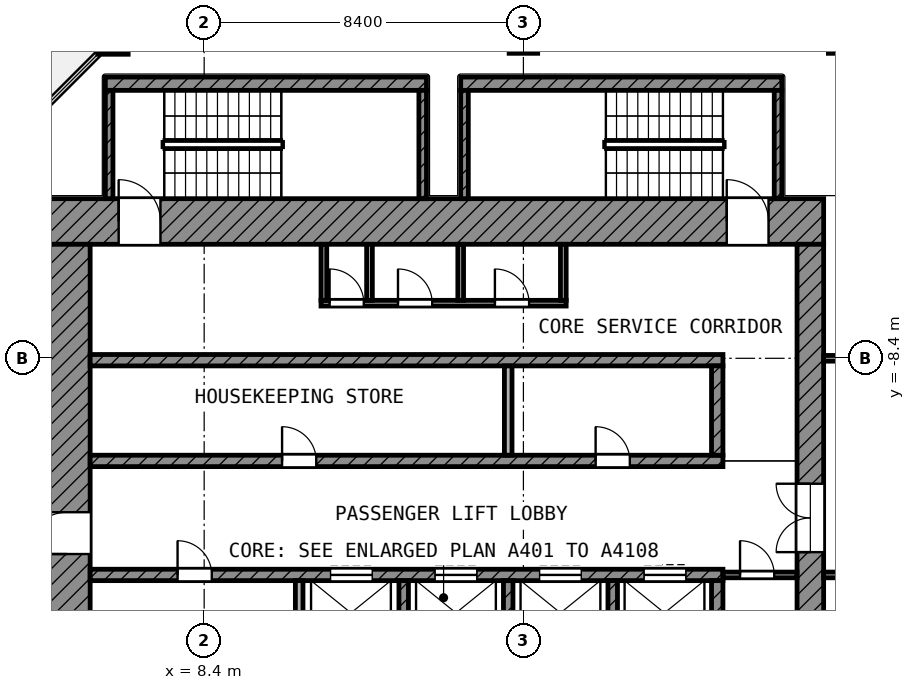
"""IFC4 building model, lengths in metres.
Left out: names, types, materials, properties, quantities, classifications, styles, units other than length and angle.
Written with IfcOpenShell. Run it as: python <this file> out.ifc"""

import sys

from ifc_helpers import new_model, si_unit, direction, frame, frame_2d, origin, origin_2d, place, context, subcontext, project, spatial, rectangle, extrude, element, fill, save


model = new_model("IFC4")
c1 = context("Model", 3, precision=1e-05, world=origin(), true_north=direction((0.0, 1.0)))
c2 = subcontext(c1, "Body", "Model", "MODEL_VIEW")
j1 = project(units=[si_unit("LENGTHUNIT", "METRE"), si_unit("PLANEANGLEUNIT", "RADIAN")], contexts=[c1])
p1 = place(None, origin())
s1 = spatial("IfcSite", under=j1, at=p1, CompositionType="ELEMENT")
p2 = place(p1, origin())
s2 = spatial("IfcBuilding", under=s1, at=p2, CompositionType="ELEMENT")
p3 = place(p2, frame((0.0, 0.0, 307.0)))
s3 = spatial("IfcBuildingStorey", under=s2, at=p3, CompositionType="ELEMENT", Elevation=307.0)
p4 = place(p3, frame((6.0, 0.0, 0.0), z_axis=(0.0, 0.0, 1.0), x_axis=(1.0, 0.0, 0.0)))
e1 = element("IfcColumn", 1, at=p4, inside=s3, PredefinedType="COLUMN", context=c2, shape_type="SweptSolid", body=[
    extrude(rectangle(XDim=0.8, YDim=0.8, at=origin_2d()), origin(), (0.0, 0.0, 1.0), 4.2),
])
for number, where, z_axis, x_axis in (
    (2, (16.8, 0.0, 0.0), (0.0, 0.0, 1.0), (1.0, 0.0, 0.0)),
    (3, (25.2, 0.0, 0.0), (0.0, 0.0, 1.0), (1.0, 0.0, 0.0)),
):
    element("IfcColumn", number, at=place(p3, frame(where, z_axis=z_axis, x_axis=x_axis)), inside=s3, PredefinedType="COLUMN", context=c2, shape_type="SweptSolid", body=[
        extrude(rectangle(XDim=0.75, YDim=0.75, at=origin_2d()), origin(), (0.0, 0.0, 1.0), 4.2),
    ])
p5 = place(p3, frame((4.2, -4.8, 0.0), z_axis=(0.0, 0.0, 1.0), x_axis=(1.0, 0.0, 0.0)))
e4 = element("IfcWall", 4, at=p5, inside=s3, PredefinedType="SHEAR", context=c2, shape_type="SweptSolid", body=[
    extrude(rectangle(XDim=20.5, YDim=1.2, at=frame_2d((10.25, 0.0))), origin(), (0.0, 0.0, 1.0), 3.6),
])
p6 = place(p5, frame((1.95, 0.0, 0.0)))
e5 = element("IfcOpeningElement", 5, at=p6, cuts=e4, PredefinedType="OPENING", context=c2, shape_type="SweptSolid", body=[
    extrude(rectangle(XDim=1.1, YDim=2.1, at=frame_2d((0.55, 1.05))), frame((0.0, 0.61, 0.0), z_axis=(0.0, -1.0, 0.0), x_axis=(1.0, 0.0, 0.0)), (0.0, 0.0, 1.0), 1.22),
])
p7 = place(p5, frame((17.95, 0.0, 0.0)))
e6 = element("IfcOpeningElement", 6, at=p7, cuts=e4, PredefinedType="OPENING", context=c2, shape_type="SweptSolid", body=[
    extrude(rectangle(XDim=1.1, YDim=2.1, at=frame_2d((0.55, 1.05))), frame((0.0, 0.61, 0.0), z_axis=(0.0, -1.0, 0.0), x_axis=(1.0, 0.0, 0.0)), (0.0, 0.0, 1.0), 1.22),
])
p8 = place(p3, frame((4.8, -24.7, 0.0), z_axis=(0.0, 0.0, 1.0), x_axis=(0.0, 1.0, 0.0)))
e7 = element("IfcWall", 7, at=p8, inside=s3, PredefinedType="SHEAR", context=c2, shape_type="SweptSolid", body=[
    extrude(rectangle(XDim=19.3, YDim=1.2, at=frame_2d((9.65, 0.0))), origin(), (0.0, 0.0, 1.0), 3.6),
])
p9 = place(p8, frame((11.15, 0.0, 0.0)))
e8 = element("IfcOpeningElement", 8, at=p9, cuts=e7, PredefinedType="OPENING", context=c2, shape_type="SweptSolid", body=[
    extrude(rectangle(XDim=1.1, YDim=2.1, at=frame_2d((0.55, 1.05))), frame((0.0, 0.61, 0.0), z_axis=(0.0, -1.0, 0.0), x_axis=(1.0, 0.0, 0.0)), (0.0, 0.0, 1.0), 1.22),
])
p10 = place(p8, frame((1.85, 0.0, 0.0)))
e9 = element("IfcOpeningElement", 9, at=p10, cuts=e7, PredefinedType="OPENING", context=c2, shape_type="SweptSolid", body=[
    extrude(rectangle(XDim=1.1, YDim=2.1, at=frame_2d((0.55, 1.05))), frame((0.0, 0.61, 0.0), z_axis=(0.0, -1.0, 0.0), x_axis=(1.0, 0.0, 0.0)), (0.0, 0.0, 1.0), 1.22),
])
p11 = place(p3, frame((24.35, -24.0, 0.0), z_axis=(0.0, 0.0, 1.0), x_axis=(0.0, 1.0, 0.0)))
e10 = element("IfcWall", 10, at=p11, inside=s3, PredefinedType="SHEAR", context=c2, shape_type="SweptSolid", body=[
    extrude(rectangle(XDim=18.6, YDim=0.7, at=frame_2d((9.3, 0.0))), origin(), (0.0, 0.0, 1.0), 3.6),
])
p12 = place(p11, frame((10.5, 0.0, 0.0)))
e11 = element("IfcOpeningElement", 11, at=p12, cuts=e10, PredefinedType="OPENING", context=c2, shape_type="SweptSolid", body=[
    extrude(rectangle(XDim=1.8, YDim=2.1, at=frame_2d((0.9, 1.05))), frame((0.0, 0.36, 0.0), z_axis=(0.0, -1.0, 0.0), x_axis=(1.0, 0.0, 0.0)), (0.0, 0.0, 1.0), 0.72),
])
p13 = place(p3, frame((5.4, -8.45, 0.0), z_axis=(0.0, 0.0, 1.0), x_axis=(1.0, 0.0, 0.0)))
e12 = element("IfcWall", 12, at=p13, inside=s3, PredefinedType="SHEAR", context=c2, shape_type="SweptSolid", body=[
    extrude(rectangle(XDim=16.65, YDim=0.3, at=frame_2d((8.325, 0.0))), origin(), (0.0, 0.0, 1.0), 3.6),
])
p14 = place(p3, frame((5.4, -11.1, 0.0), z_axis=(0.0, 0.0, 1.0), x_axis=(1.0, 0.0, 0.0)))
e13 = element("IfcWall", 13, at=p14, inside=s3, PredefinedType="SHEAR", context=c2, shape_type="SweptSolid", body=[
    extrude(rectangle(XDim=16.65, YDim=0.3, at=frame_2d((8.325, 0.0))), origin(), (0.0, 0.0, 1.0), 3.6),
])
p15 = place(p14, frame((5.05, 0.0, 0.0)))
e14 = element("IfcOpeningElement", 14, at=p15, cuts=e13, PredefinedType="OPENING", context=c2, shape_type="SweptSolid", body=[
    extrude(rectangle(XDim=0.9, YDim=2.1, at=frame_2d((0.45, 1.05))), frame((0.0, 0.16, 0.0), z_axis=(0.0, -1.0, 0.0), x_axis=(1.0, 0.0, 0.0)), (0.0, 0.0, 1.0), 0.32),
])
p16 = place(p14, frame((13.3, 0.0, 0.0)))
e15 = element("IfcOpeningElement", 15, at=p16, cuts=e13, PredefinedType="OPENING", context=c2, shape_type="SweptSolid", body=[
    extrude(rectangle(XDim=0.9, YDim=2.1, at=frame_2d((0.45, 1.05))), frame((0.0, 0.16, 0.0), z_axis=(0.0, -1.0, 0.0), x_axis=(1.0, 0.0, 0.0)), (0.0, 0.0, 1.0), 0.32),
])
p17 = place(p3, frame((5.4, -14.1, 0.0), z_axis=(0.0, 0.0, 1.0), x_axis=(1.0, 0.0, 0.0)))
e16 = element("IfcWall", 16, at=p17, inside=s3, PredefinedType="SHEAR", context=c2, shape_type="SweptSolid", body=[
    extrude(rectangle(XDim=16.65, YDim=0.3, at=frame_2d((8.325, 0.0))), origin(), (0.0, 0.0, 1.0), 3.6),
])
p18 = place(p17, frame((6.325, 0.0, 0.0)))
e17 = element("IfcOpeningElement", 17, at=p18, cuts=e16, PredefinedType="OPENING", context=c2, shape_type="SweptSolid", body=[
    extrude(rectangle(XDim=1.1, YDim=2.1, at=frame_2d((0.55, 1.05))), frame((0.0, 0.16, 0.0), z_axis=(0.0, -1.0, 0.0), x_axis=(1.0, 0.0, 0.0)), (0.0, 0.0, 1.0), 0.32),
])
p19 = place(p17, frame((9.075, 0.0, 0.0)))
e18 = element("IfcOpeningElement", 18, at=p19, cuts=e16, PredefinedType="OPENING", context=c2, shape_type="SweptSolid", body=[
    extrude(rectangle(XDim=1.1, YDim=2.1, at=frame_2d((0.55, 1.05))), frame((0.0, 0.16, 0.0), z_axis=(0.0, -1.0, 0.0), x_axis=(1.0, 0.0, 0.0)), (0.0, 0.0, 1.0), 0.32),
])
p20 = place(p17, frame((11.825, 0.0, 0.0)))
e19 = element("IfcOpeningElement", 19, at=p20, cuts=e16, PredefinedType="OPENING", context=c2, shape_type="SweptSolid", body=[
    extrude(rectangle(XDim=1.1, YDim=2.1, at=frame_2d((0.55, 1.05))), frame((0.0, 0.16, 0.0), z_axis=(0.0, -1.0, 0.0), x_axis=(1.0, 0.0, 0.0)), (0.0, 0.0, 1.0), 0.32),
])
p21 = place(p17, frame((14.575, 0.0, 0.0)))
e20 = element("IfcOpeningElement", 20, at=p21, cuts=e16, PredefinedType="OPENING", context=c2, shape_type="SweptSolid", body=[
    extrude(rectangle(XDim=1.1, YDim=2.1, at=frame_2d((0.55, 1.05))), frame((0.0, 0.16, 0.0), z_axis=(0.0, -1.0, 0.0), x_axis=(1.0, 0.0, 0.0)), (0.0, 0.0, 1.0), 0.32),
])
p22 = place(p17, frame((2.3, 0.0, 0.0)))
e21 = element("IfcOpeningElement", 21, at=p22, cuts=e16, PredefinedType="OPENING", context=c2, shape_type="SweptSolid", body=[
    extrude(rectangle(XDim=0.9, YDim=2.1, at=frame_2d((0.45, 1.05))), frame((0.0, 0.16, 0.0), z_axis=(0.0, -1.0, 0.0), x_axis=(1.0, 0.0, 0.0)), (0.0, 0.0, 1.0), 0.32),
])
p23 = place(p3, frame((21.9, -10.95, 0.0), z_axis=(0.0, 0.0, 1.0), x_axis=(0.0, 1.0, 0.0)))
e22 = element("IfcWall", 22, at=p23, inside=s3, PredefinedType="SHEAR", context=c2, shape_type="SweptSolid", body=[
    extrude(rectangle(XDim=2.35, YDim=0.3, at=frame_2d((1.175, 0.0))), origin(), (0.0, 0.0, 1.0), 3.6),
])
p24 = place(p3, frame((21.9, -16.6, 0.0), z_axis=(0.0, 0.0, 1.0), x_axis=(0.0, 1.0, 0.0)))
e23 = element("IfcWall", 23, at=p24, inside=s3, PredefinedType="SHEAR", context=c2, shape_type="SweptSolid", body=[
    extrude(rectangle(XDim=2.35, YDim=0.3, at=frame_2d((1.175, 0.0))), origin(), (0.0, 0.0, 1.0), 3.6),
])
p25 = place(p3, frame((16.4, -10.95, 0.0), z_axis=(0.0, 0.0, 1.0), x_axis=(0.0, 1.0, 0.0)))
e24 = element("IfcWall", 24, at=p25, inside=s3, PredefinedType="PARTITIONING", context=c2, shape_type="SweptSolid", body=[
    extrude(rectangle(XDim=2.35, YDim=0.2, at=frame_2d((1.175, 0.0))), origin(), (0.0, 0.0, 1.0), 3.6),
])
p26 = place(p3, frame((10.9, -16.6, 0.0), z_axis=(0.0, 0.0, 1.0), x_axis=(0.0, 1.0, 0.0)))
e25 = element("IfcWall", 25, at=p26, inside=s3, PredefinedType="PARTITIONING", context=c2, shape_type="SweptSolid", body=[
    extrude(rectangle(XDim=2.35, YDim=0.2, at=frame_2d((1.175, 0.0))), origin(), (0.0, 0.0, 1.0), 3.6),
])
for number, where, z_axis, x_axis in (
    (26, (13.65, -16.6, 0.0), (0.0, 0.0, 1.0), (0.0, 1.0, 0.0)),
    (27, (16.4, -16.6, 0.0), (0.0, 0.0, 1.0), (0.0, 1.0, 0.0)),
    (28, (19.15, -16.6, 0.0), (0.0, 0.0, 1.0), (0.0, 1.0, 0.0)),
):
    element("IfcWall", number, at=place(p3, frame(where, z_axis=z_axis, x_axis=x_axis)), inside=s3, PredefinedType="SHEAR", context=c2, shape_type="SweptSolid", body=[
        extrude(rectangle(XDim=2.35, YDim=0.25, at=frame_2d((1.175, 0.0))), origin(), (0.0, 0.0, 1.0), 3.6),
    ])
p27 = place(p3, frame((22.05, -14.1, 0.0), z_axis=(0.0, 0.0, 1.0), x_axis=(1.0, 0.0, 0.0)))
e29 = element("IfcWall", 29, at=p27, inside=s3, PredefinedType="PARTITIONING", context=c2, shape_type="SweptSolid", body=[
    extrude(rectangle(XDim=1.95, YDim=0.15, at=frame_2d((0.975, 0.0))), origin(), (0.0, 0.0, 1.0), 3.6),
])
p28 = place(p27, frame((0.45, 0.0, 0.0)))
e30 = element("IfcOpeningElement", 30, at=p28, cuts=e29, PredefinedType="OPENING", context=c2, shape_type="SweptSolid", body=[
    extrude(rectangle(XDim=0.9, YDim=2.1, at=frame_2d((0.45, 1.05))), frame((0.0, 0.085, 0.0), z_axis=(0.0, -1.0, 0.0), x_axis=(1.0, 0.0, 0.0)), (0.0, 0.0, 1.0), 0.17),
])
p29 = place(p3, frame((11.475, -6.95, 0.0), z_axis=(0.0, 0.0, 1.0), x_axis=(1.0, 0.0, 0.0)))
e31 = element("IfcWall", 31, at=p29, inside=s3, PredefinedType="PARTITIONING", context=c2, shape_type="SweptSolid", body=[
    extrude(rectangle(XDim=6.45, YDim=0.15, at=frame_2d((3.225, 0.0))), origin(), (0.0, 0.0, 1.0), 3.6),
])
p30 = place(p29, frame((0.225, 0.0, 0.0)))
e32 = element("IfcOpeningElement", 32, at=p30, cuts=e31, PredefinedType="OPENING", context=c2, shape_type="SweptSolid", body=[
    extrude(rectangle(XDim=0.9, YDim=2.1, at=frame_2d((0.45, 1.05))), frame((0.0, 0.085, 0.0), z_axis=(0.0, -1.0, 0.0), x_axis=(1.0, 0.0, 0.0)), (0.0, 0.0, 1.0), 0.17),
])
p31 = place(p29, frame((2.025, 0.0, 0.0)))
e33 = element("IfcOpeningElement", 33, at=p31, cuts=e31, PredefinedType="OPENING", context=c2, shape_type="SweptSolid", body=[
    extrude(rectangle(XDim=0.9, YDim=2.1, at=frame_2d((0.45, 1.05))), frame((0.0, 0.085, 0.0), z_axis=(0.0, -1.0, 0.0), x_axis=(1.0, 0.0, 0.0)), (0.0, 0.0, 1.0), 0.17),
])
p32 = place(p29, frame((4.575, 0.0, 0.0)))
e34 = element("IfcOpeningElement", 34, at=p32, cuts=e31, PredefinedType="OPENING", context=c2, shape_type="SweptSolid", body=[
    extrude(rectangle(XDim=0.9, YDim=2.1, at=frame_2d((0.45, 1.05))), frame((0.0, 0.085, 0.0), z_axis=(0.0, -1.0, 0.0), x_axis=(1.0, 0.0, 0.0)), (0.0, 0.0, 1.0), 0.17),
])
for number, where, z_axis, x_axis in (
    (35, (11.55, -6.875, 0.0), (0.0, 0.0, 1.0), (0.0, 1.0, 0.0)),
    (36, (12.75, -6.875, 0.0), (0.0, 0.0, 1.0), (0.0, 1.0, 0.0)),
    (37, (15.15, -6.875, 0.0), (0.0, 0.0, 1.0), (0.0, 1.0, 0.0)),
    (38, (17.85, -6.875, 0.0), (0.0, 0.0, 1.0), (0.0, 1.0, 0.0)),
):
    element("IfcWall", number, at=place(p3, frame(where, z_axis=z_axis, x_axis=x_axis)), inside=s3, PredefinedType="PARTITIONING", context=c2, shape_type="SweptSolid", body=[
        extrude(rectangle(XDim=1.475, YDim=0.15, at=frame_2d((0.738, 0.0))), origin(), (0.0, 0.0, 1.0), 3.6),
    ])
p33 = place(p3, frame((5.8, -1.175, 0.0), z_axis=(0.0, 0.0, 1.0), x_axis=(1.0, 0.0, 0.0)))
e39 = element("IfcWall", 39, at=p33, inside=s3, PredefinedType="SHEAR", context=c2, shape_type="SweptSolid", body=[
    extrude(rectangle(XDim=8.45, YDim=0.35, at=frame_2d((4.225, 0.0))), origin(), (0.0, 0.0, 1.0), 3.6),
])
for number, where, z_axis, x_axis in (
    (40, (5.9, -4.2, 0.0), (0.0, 0.0, 1.0), (0.0, 1.0, 0.0)),
    (41, (14.15, -4.2, 0.0), (0.0, 0.0, 1.0), (0.0, 1.0, 0.0)),
):
    element("IfcWall", number, at=place(p3, frame(where, z_axis=z_axis, x_axis=x_axis)), inside=s3, PredefinedType="SHEAR", context=c2, shape_type="SweptSolid", body=[
        extrude(rectangle(XDim=2.85, YDim=0.2, at=frame_2d((1.425, 0.0))), origin(), (0.0, 0.0, 1.0), 3.6),
    ])
p34 = place(p3, frame((15.15, -1.175, 0.0), z_axis=(0.0, 0.0, 1.0), x_axis=(1.0, 0.0, 0.0)))
e42 = element("IfcWall", 42, at=p34, inside=s3, PredefinedType="SHEAR", context=c2, shape_type="SweptSolid", body=[
    extrude(rectangle(XDim=8.45, YDim=0.35, at=frame_2d((4.225, 0.0))), origin(), (0.0, 0.0, 1.0), 3.6),
])
for number, where, z_axis, x_axis in (
    (43, (15.25, -4.2, 0.0), (0.0, 0.0, 1.0), (0.0, 1.0, 0.0)),
    (44, (23.5, -4.2, 0.0), (0.0, 0.0, 1.0), (0.0, 1.0, 0.0)),
):
    element("IfcWall", number, at=place(p3, frame(where, z_axis=z_axis, x_axis=x_axis)), inside=s3, PredefinedType="SHEAR", context=c2, shape_type="SweptSolid", body=[
        extrude(rectangle(XDim=2.85, YDim=0.2, at=frame_2d((1.425, 0.0))), origin(), (0.0, 0.0, 1.0), 3.6),
    ])
p35 = place(p3, frame((24.7, -14.1, 0.0), z_axis=(0.0, 0.0, 1.0), x_axis=(1.0, 0.0, 0.0)))
e45 = element("IfcWall", 45, at=p35, inside=s3, PredefinedType="PARTITIONING", context=c2, shape_type="SweptSolid", body=[
    extrude(rectangle(XDim=4.625, YDim=0.15, at=frame_2d((2.312, 0.0))), origin(), (0.0, 0.0, 1.0), 3.6),
])
p36 = place(p35, frame((1.85, 0.0, 0.0)))
e46 = element("IfcOpeningElement", 46, at=p36, cuts=e45, PredefinedType="OPENING", context=c2, shape_type="SweptSolid", body=[
    extrude(rectangle(XDim=1.5, YDim=2.1, at=frame_2d((0.75, 1.05))), frame((0.0, 0.085, 0.0), z_axis=(0.0, -1.0, 0.0), x_axis=(1.0, 0.0, 0.0)), (0.0, 0.0, 1.0), 0.17),
])
p37 = place(p3, frame((24.7, -8.4, 0.0), z_axis=(0.0, 0.0, 1.0), x_axis=(1.0, 0.0, 0.0)))
e47 = element("IfcWall", 47, at=p37, inside=s3, PredefinedType="PARTITIONING", context=c2, shape_type="SweptSolid", body=[
    extrude(rectangle(XDim=15.582, YDim=0.15, at=frame_2d((7.791, 0.0))), origin(), (0.0, 0.0, 1.0), 3.6),
])
p38 = place(p37, frame((1.85, 0.0, 0.0)))
e48 = element("IfcOpeningElement", 48, at=p38, cuts=e47, PredefinedType="OPENING", context=c2, shape_type="SweptSolid", body=[
    extrude(rectangle(XDim=1.2, YDim=2.1, at=frame_2d((0.6, 1.05))), frame((0.0, 0.085, 0.0), z_axis=(0.0, -1.0, 0.0), x_axis=(1.0, 0.0, 0.0)), (0.0, 0.0, 1.0), 0.17),
])
p39 = place(p37, frame((6.7, 0.0, 0.0)))
e49 = element("IfcOpeningElement", 49, at=p39, cuts=e47, PredefinedType="OPENING", context=c2, shape_type="SweptSolid", body=[
    extrude(rectangle(XDim=1.2, YDim=2.1, at=frame_2d((0.6, 1.05))), frame((0.0, 0.085, 0.0), z_axis=(0.0, -1.0, 0.0), x_axis=(1.0, 0.0, 0.0)), (0.0, 0.0, 1.0), 0.17),
])
p40 = place(p37, frame((9.4, 0.0, 0.0)))
e50 = element("IfcOpeningElement", 50, at=p40, cuts=e47, PredefinedType="OPENING", context=c2, shape_type="SweptSolid", body=[
    extrude(rectangle(XDim=1.2, YDim=2.1, at=frame_2d((0.6, 1.05))), frame((0.0, 0.085, 0.0), z_axis=(0.0, -1.0, 0.0), x_axis=(1.0, 0.0, 0.0)), (0.0, 0.0, 1.0), 0.17),
])
p41 = place(p18, origin())
e51 = element("IfcDoor", 51, at=p41, inside=s3, OperationType="DOUBLE_DOOR_SLIDING", PredefinedType="DOOR", context=c2, shape_type="SweptSolid", body=[
    extrude(rectangle(XDim=1.1, YDim=2.1, at=frame_2d((0.55, 1.05))), frame((0.0, 0.025, 0.0), z_axis=(0.0, -1.0, 0.0), x_axis=(1.0, 0.0, 0.0)), (0.0, 0.0, 1.0), 0.05),
])
fill(e17, e51)
p42 = place(p19, origin())
e52 = element("IfcDoor", 52, at=p42, inside=s3, OperationType="DOUBLE_DOOR_SLIDING", PredefinedType="DOOR", context=c2, shape_type="SweptSolid", body=[
    extrude(rectangle(XDim=1.1, YDim=2.1, at=frame_2d((0.55, 1.05))), frame((0.0, 0.025, 0.0), z_axis=(0.0, -1.0, 0.0), x_axis=(1.0, 0.0, 0.0)), (0.0, 0.0, 1.0), 0.05),
])
fill(e18, e52)
p43 = place(p20, origin())
e53 = element("IfcDoor", 53, at=p43, inside=s3, OperationType="DOUBLE_DOOR_SLIDING", PredefinedType="DOOR", context=c2, shape_type="SweptSolid", body=[
    extrude(rectangle(XDim=1.1, YDim=2.1, at=frame_2d((0.55, 1.05))), frame((0.0, 0.025, 0.0), z_axis=(0.0, -1.0, 0.0), x_axis=(1.0, 0.0, 0.0)), (0.0, 0.0, 1.0), 0.05),
])
fill(e19, e53)
p44 = place(p21, origin())
e54 = element("IfcDoor", 54, at=p44, inside=s3, OperationType="DOUBLE_DOOR_SLIDING", PredefinedType="DOOR", context=c2, shape_type="SweptSolid", body=[
    extrude(rectangle(XDim=1.1, YDim=2.1, at=frame_2d((0.55, 1.05))), frame((0.0, 0.025, 0.0), z_axis=(0.0, -1.0, 0.0), x_axis=(1.0, 0.0, 0.0)), (0.0, 0.0, 1.0), 0.05),
])
fill(e20, e54)
p45 = place(p9, origin())
e55 = element("IfcDoor", 55, at=p45, inside=s3, OperationType="SINGLE_SWING_LEFT", PredefinedType="DOOR", context=c2, shape_type="SweptSolid", body=[
    extrude(rectangle(XDim=1.1, YDim=2.1, at=frame_2d((0.55, 1.05))), frame((0.0, 0.025, 0.0), z_axis=(0.0, -1.0, 0.0), x_axis=(1.0, 0.0, 0.0)), (0.0, 0.0, 1.0), 0.05),
])
fill(e8, e55)
p46 = place(p6, origin())
e56 = element("IfcDoor", 56, at=p46, inside=s3, OperationType="SINGLE_SWING_LEFT", PredefinedType="DOOR", context=c2, shape_type="SweptSolid", body=[
    extrude(rectangle(XDim=1.1, YDim=2.1, at=frame_2d((0.55, 1.05))), frame((0.0, 0.025, 0.0), z_axis=(0.0, -1.0, 0.0), x_axis=(1.0, 0.0, 0.0)), (0.0, 0.0, 1.0), 0.05),
])
fill(e5, e56)
p47 = place(p7, origin())
e57 = element("IfcDoor", 57, at=p47, inside=s3, OperationType="SINGLE_SWING_LEFT", PredefinedType="DOOR", context=c2, shape_type="SweptSolid", body=[
    extrude(rectangle(XDim=1.1, YDim=2.1, at=frame_2d((0.55, 1.05))), frame((0.0, 0.025, 0.0), z_axis=(0.0, -1.0, 0.0), x_axis=(1.0, 0.0, 0.0)), (0.0, 0.0, 1.0), 0.05),
])
fill(e6, e57)
p48 = place(p12, origin())
e58 = element("IfcDoor", 58, at=p48, inside=s3, OperationType="DOUBLE_DOOR_SINGLE_SWING", PredefinedType="DOOR", context=c2, shape_type="SweptSolid", body=[
    extrude(rectangle(XDim=1.8, YDim=2.1, at=frame_2d((0.9, 1.05))), frame((0.0, 0.025, 0.0), z_axis=(0.0, -1.0, 0.0), x_axis=(1.0, 0.0, 0.0)), (0.0, 0.0, 1.0), 0.05),
])
fill(e11, e58)
p49 = place(p30, origin())
e59 = element("IfcDoor", 59, at=p49, inside=s3, OperationType="SINGLE_SWING_LEFT", PredefinedType="DOOR", context=c2, shape_type="SweptSolid", body=[
    extrude(rectangle(XDim=0.9, YDim=2.1, at=frame_2d((0.45, 1.05))), frame((0.0, 0.025, 0.0), z_axis=(0.0, -1.0, 0.0), x_axis=(1.0, 0.0, 0.0)), (0.0, 0.0, 1.0), 0.05),
])
fill(e32, e59)
p50 = place(p31, origin())
e60 = element("IfcDoor", 60, at=p50, inside=s3, OperationType="SINGLE_SWING_LEFT", PredefinedType="DOOR", context=c2, shape_type="SweptSolid", body=[
    extrude(rectangle(XDim=0.9, YDim=2.1, at=frame_2d((0.45, 1.05))), frame((0.0, 0.025, 0.0), z_axis=(0.0, -1.0, 0.0), x_axis=(1.0, 0.0, 0.0)), (0.0, 0.0, 1.0), 0.05),
])
fill(e33, e60)
p51 = place(p32, origin())
e61 = element("IfcDoor", 61, at=p51, inside=s3, OperationType="SINGLE_SWING_LEFT", PredefinedType="DOOR", context=c2, shape_type="SweptSolid", body=[
    extrude(rectangle(XDim=0.9, YDim=2.1, at=frame_2d((0.45, 1.05))), frame((0.0, 0.025, 0.0), z_axis=(0.0, -1.0, 0.0), x_axis=(1.0, 0.0, 0.0)), (0.0, 0.0, 1.0), 0.05),
])
fill(e34, e61)
p52 = place(p28, origin())
e62 = element("IfcDoor", 62, at=p52, inside=s3, OperationType="SINGLE_SWING_LEFT", PredefinedType="DOOR", context=c2, shape_type="SweptSolid", body=[
    extrude(rectangle(XDim=0.9, YDim=2.1, at=frame_2d((0.45, 1.05))), frame((0.0, 0.025, 0.0), z_axis=(0.0, -1.0, 0.0), x_axis=(1.0, 0.0, 0.0)), (0.0, 0.0, 1.0), 0.05),
])
fill(e30, e62)
p53 = place(p15, origin())
e63 = element("IfcDoor", 63, at=p53, inside=s3, OperationType="SINGLE_SWING_LEFT", PredefinedType="DOOR", context=c2, shape_type="SweptSolid", body=[
    extrude(rectangle(XDim=0.9, YDim=2.1, at=frame_2d((0.45, 1.05))), frame((0.0, 0.025, 0.0), z_axis=(0.0, -1.0, 0.0), x_axis=(1.0, 0.0, 0.0)), (0.0, 0.0, 1.0), 0.05),
])
fill(e14, e63)
p54 = place(p16, origin())
e64 = element("IfcDoor", 64, at=p54, inside=s3, OperationType="SINGLE_SWING_LEFT", PredefinedType="DOOR", context=c2, shape_type="SweptSolid", body=[
    extrude(rectangle(XDim=0.9, YDim=2.1, at=frame_2d((0.45, 1.05))), frame((0.0, 0.025, 0.0), z_axis=(0.0, -1.0, 0.0), x_axis=(1.0, 0.0, 0.0)), (0.0, 0.0, 1.0), 0.05),
])
fill(e15, e64)
p55 = place(p22, origin())
e65 = element("IfcDoor", 65, at=p55, inside=s3, OperationType="SINGLE_SWING_LEFT", PredefinedType="DOOR", context=c2, shape_type="SweptSolid", body=[
    extrude(rectangle(XDim=0.9, YDim=2.1, at=frame_2d((0.45, 1.05))), frame((0.0, 0.025, 0.0), z_axis=(0.0, -1.0, 0.0), x_axis=(1.0, 0.0, 0.0)), (0.0, 0.0, 1.0), 0.05),
])
fill(e21, e65)
save(model, sys.argv[1])
